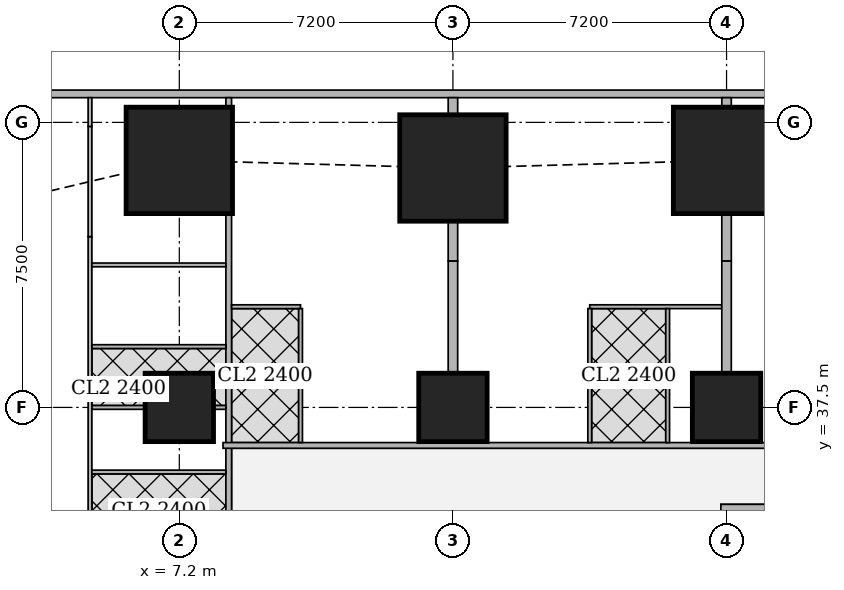
"""IFC4 building model, lengths in metres.
Left out: names, types, materials, properties, quantities, classifications, styles, units other than length and angle.
Written with IfcOpenShell. Run it as: python <this file> out.ifc"""

import sys

from ifc_helpers import new_model, si_unit, direction, frame, frame_2d, origin, origin_2d, place, context, subcontext, project, spatial, rectangle, extrude, element, fill, save


model = new_model("IFC4")
c1 = context("Model", 3, precision=1e-05, world=origin(), true_north=direction((0.0, 1.0)))
c2 = subcontext(c1, "Body", "Model", "MODEL_VIEW")
j1 = project(units=[si_unit("LENGTHUNIT", "METRE"), si_unit("PLANEANGLEUNIT", "RADIAN")], contexts=[c1])
p1 = place(None, origin())
s1 = spatial("IfcSite", under=j1, at=p1, CompositionType="ELEMENT")
p2 = place(p1, origin())
s2 = spatial("IfcBuilding", under=s1, at=p2, CompositionType="ELEMENT")
p3 = place(p2, frame((0.0, 0.0, 42.5)))
s3 = spatial("IfcBuildingStorey", under=s2, at=p3, CompositionType="ELEMENT", Elevation=42.5)
for number, where, z_axis, x_axis in (
    (1, (7.2, 37.5, 0.0), (0.0, 0.0, 1.0), (1.0, 0.0, 0.0)),
    (2, (14.4, 37.5, 0.0), (0.0, 0.0, 1.0), (1.0, 0.0, 0.0)),
    (3, (21.6, 37.5, 0.0), (0.0, 0.0, 1.0), (1.0, 0.0, 0.0)),
):
    element("IfcColumn", number, at=place(p3, frame(where, z_axis=z_axis, x_axis=x_axis)), inside=s3, PredefinedType="COLUMN", context=c2, shape_type="SweptSolid", body=[
        extrude(rectangle(XDim=1.8, YDim=1.8, at=origin_2d()), origin(), (0.0, 0.0, 1.0), 3.75),
    ])
for number, where, z_axis, x_axis in (
    (4, (7.2, 44.0, 0.0), (0.0, 0.0, 1.0), (1.0, 0.0, 0.0)),
    (5, (14.4, 43.8, 0.0), (0.0, 0.0, 1.0), (1.0, 0.0, 0.0)),
    (6, (21.6, 44.0, 0.0), (0.0, 0.0, 1.0), (1.0, 0.0, 0.0)),
):
    element("IfcColumn", number, at=place(p3, frame(where, z_axis=z_axis, x_axis=x_axis)), inside=s3, PredefinedType="COLUMN", context=c2, shape_type="SweptSolid", body=[
        extrude(rectangle(XDim=2.8, YDim=2.8, at=origin_2d()), origin(), (0.0, 0.0, 1.0), 3.75),
    ])
p4 = place(p3, frame((21.45, 34.8, 0.0), z_axis=(0.0, 0.0, 1.0), x_axis=(1.0, 0.0, 0.0)))
e7 = element("IfcWall", 7, at=p4, inside=s3, PredefinedType="SHEAR", context=c2, shape_type="SweptSolid", body=[
    extrude(rectangle(XDim=7.5, YDim=0.3, at=frame_2d((3.75, 0.0))), origin(), (0.0, 0.0, 1.0), 3.75),
])
p5 = place(p4, frame((0.5, 0.0, 0.0)))
e8 = element("IfcOpeningElement", 8, at=p5, cuts=e7, PredefinedType="OPENING", context=c2, shape_type="SweptSolid", body=[
    extrude(rectangle(XDim=1.1, YDim=2.1, at=frame_2d((0.55, 1.05))), frame((0.0, 0.16, 0.0), z_axis=(0.0, -1.0, 0.0), x_axis=(1.0, 0.0, 0.0)), (0.0, 0.0, 1.0), 0.32),
])
p6 = place(p3, frame((40.106, 45.75, 0.0), z_axis=(0.0, 0.0, 1.0), x_axis=(-1.0, 0.0, 0.0)))
e9 = element("IfcWall", 9, at=p6, inside=s3, PredefinedType="SOLIDWALL", context=c2, shape_type="SweptSolid", body=[
    extrude(rectangle(XDim=37.943, YDim=0.2, at=frame_2d((18.971, 0.0))), origin(), (0.0, 0.0, 1.0), 3.5),
])
p7 = place(p6, frame((8.606, 0.0, 0.9)))
e10 = element("IfcOpeningElement", 10, at=p7, cuts=e9, PredefinedType="OPENING", context=c2, shape_type="SweptSolid", body=[
    extrude(rectangle(XDim=1.8, YDim=1.5, at=frame_2d((0.9, 0.75))), frame((0.0, 0.11, 0.0), z_axis=(0.0, -1.0, 0.0), x_axis=(1.0, 0.0, 0.0)), (0.0, 0.0, 1.0), 0.22),
])
p8 = place(p6, frame((12.206, 0.0, 0.9)))
e11 = element("IfcOpeningElement", 11, at=p8, cuts=e9, PredefinedType="OPENING", context=c2, shape_type="SweptSolid", body=[
    extrude(rectangle(XDim=1.8, YDim=1.5, at=frame_2d((0.9, 0.75))), frame((0.0, 0.11, 0.0), z_axis=(0.0, -1.0, 0.0), x_axis=(1.0, 0.0, 0.0)), (0.0, 0.0, 1.0), 0.22),
])
p9 = place(p6, frame((15.806, 0.0, 0.9)))
e12 = element("IfcOpeningElement", 12, at=p9, cuts=e9, PredefinedType="OPENING", context=c2, shape_type="SweptSolid", body=[
    extrude(rectangle(XDim=1.8, YDim=1.5, at=frame_2d((0.9, 0.75))), frame((0.0, 0.11, 0.0), z_axis=(0.0, -1.0, 0.0), x_axis=(1.0, 0.0, 0.0)), (0.0, 0.0, 1.0), 0.22),
])
p10 = place(p6, frame((19.406, 0.0, 0.9)))
e13 = element("IfcOpeningElement", 13, at=p10, cuts=e9, PredefinedType="OPENING", context=c2, shape_type="SweptSolid", body=[
    extrude(rectangle(XDim=1.8, YDim=1.5, at=frame_2d((0.9, 0.75))), frame((0.0, 0.11, 0.0), z_axis=(0.0, -1.0, 0.0), x_axis=(1.0, 0.0, 0.0)), (0.0, 0.0, 1.0), 0.22),
])
p11 = place(p6, frame((23.006, 0.0, 0.9)))
e14 = element("IfcOpeningElement", 14, at=p11, cuts=e9, PredefinedType="OPENING", context=c2, shape_type="SweptSolid", body=[
    extrude(rectangle(XDim=1.8, YDim=1.5, at=frame_2d((0.9, 0.75))), frame((0.0, 0.11, 0.0), z_axis=(0.0, -1.0, 0.0), x_axis=(1.0, 0.0, 0.0)), (0.0, 0.0, 1.0), 0.22),
])
p12 = place(p6, frame((26.606, 0.0, 0.9)))
e15 = element("IfcOpeningElement", 15, at=p12, cuts=e9, PredefinedType="OPENING", context=c2, shape_type="SweptSolid", body=[
    extrude(rectangle(XDim=1.8, YDim=1.5, at=frame_2d((0.9, 0.75))), frame((0.0, 0.11, 0.0), z_axis=(0.0, -1.0, 0.0), x_axis=(1.0, 0.0, 0.0)), (0.0, 0.0, 1.0), 0.22),
])
p13 = place(p3, frame((8.5, 2.426, 0.0), z_axis=(0.0, 0.0, 1.0), x_axis=(0.0, 1.0, 0.0)))
e16 = element("IfcWall", 16, at=p13, inside=s3, PredefinedType="SOLIDWALL", context=c2, shape_type="SweptSolid", body=[
    extrude(rectangle(XDim=40.173, YDim=0.15, at=frame_2d((20.086, 0.0))), origin(), (0.0, 0.0, 1.0), 3.5),
])
p14 = place(p13, frame((9.986, 0.0, 0.0)))
e17 = element("IfcOpeningElement", 17, at=p14, cuts=e16, PredefinedType="OPENING", context=c2, shape_type="SweptSolid", body=[
    extrude(rectangle(XDim=1.0, YDim=2.1, at=frame_2d((0.5, 1.05))), frame((0.0, 0.085, 0.0), z_axis=(0.0, -1.0, 0.0), x_axis=(1.0, 0.0, 0.0)), (0.0, 0.0, 1.0), 0.17),
])
p15 = place(p13, frame((14.161, 0.0, 0.0)))
e18 = element("IfcOpeningElement", 18, at=p15, cuts=e16, PredefinedType="OPENING", context=c2, shape_type="SweptSolid", body=[
    extrude(rectangle(XDim=1.0, YDim=2.1, at=frame_2d((0.5, 1.05))), frame((0.0, 0.085, 0.0), z_axis=(0.0, -1.0, 0.0), x_axis=(1.0, 0.0, 0.0)), (0.0, 0.0, 1.0), 0.17),
])
p16 = place(p13, frame((21.662, 0.0, 0.0)))
e19 = element("IfcOpeningElement", 19, at=p16, cuts=e16, PredefinedType="OPENING", context=c2, shape_type="SweptSolid", body=[
    extrude(rectangle(XDim=1.0, YDim=2.1, at=frame_2d((0.5, 1.05))), frame((0.0, 0.085, 0.0), z_axis=(0.0, -1.0, 0.0), x_axis=(1.0, 0.0, 0.0)), (0.0, 0.0, 1.0), 0.17),
])
p17 = place(p13, frame((29.161, 0.0, 0.0)))
e20 = element("IfcOpeningElement", 20, at=p17, cuts=e16, PredefinedType="OPENING", context=c2, shape_type="SweptSolid", body=[
    extrude(rectangle(XDim=1.0, YDim=2.1, at=frame_2d((0.5, 1.05))), frame((0.0, 0.085, 0.0), z_axis=(0.0, -1.0, 0.0), x_axis=(1.0, 0.0, 0.0)), (0.0, 0.0, 1.0), 0.17),
])
p18 = place(p3, frame((8.5, 45.401, 0.0), z_axis=(0.0, 0.0, 1.0), x_axis=(0.0, 1.0, 0.0)))
e21 = element("IfcWall", 21, at=p18, inside=s3, PredefinedType="SOLIDWALL", context=c2, shape_type="SweptSolid", body=[
    extrude(rectangle(XDim=0.249, YDim=0.15, at=frame_2d((0.125, 0.0))), origin(), (0.0, 0.0, 1.0), 3.5),
])
p19 = place(p3, frame((8.35, 36.5, 0.0), z_axis=(0.0, 0.0, 1.0), x_axis=(1.0, 0.0, 0.0)))
e22 = element("IfcWall", 22, at=p19, inside=s3, PredefinedType="SOLIDWALL", context=c2, shape_type="SweptSolid", body=[
    extrude(rectangle(XDim=26.415, YDim=0.15, at=frame_2d((13.208, 0.0))), origin(), (0.0, 0.0, 1.0), 3.5),
])
p20 = place(p19, frame((3.383, 0.0, 0.0)))
e23 = element("IfcOpeningElement", 23, at=p20, cuts=e22, PredefinedType="OPENING", context=c2, shape_type="SweptSolid", body=[
    extrude(rectangle(XDim=1.0, YDim=2.1, at=frame_2d((0.5, 1.05))), frame((0.0, 0.085, 0.0), z_axis=(0.0, -1.0, 0.0), x_axis=(1.0, 0.0, 0.0)), (0.0, 0.0, 1.0), 0.17),
])
p21 = place(p19, frame((7.65, 0.0, 0.0)))
e24 = element("IfcOpeningElement", 24, at=p21, cuts=e22, PredefinedType="OPENING", context=c2, shape_type="SweptSolid", body=[
    extrude(rectangle(XDim=1.0, YDim=2.1, at=frame_2d((0.5, 1.05))), frame((0.0, 0.085, 0.0), z_axis=(0.0, -1.0, 0.0), x_axis=(1.0, 0.0, 0.0)), (0.0, 0.0, 1.0), 0.17),
])
p22 = place(p19, frame((14.85, 0.0, 0.0)))
e25 = element("IfcOpeningElement", 25, at=p22, cuts=e22, PredefinedType="OPENING", context=c2, shape_type="SweptSolid", body=[
    extrude(rectangle(XDim=1.0, YDim=2.1, at=frame_2d((0.5, 1.05))), frame((0.0, 0.085, 0.0), z_axis=(0.0, -1.0, 0.0), x_axis=(1.0, 0.0, 0.0)), (0.0, 0.0, 1.0), 0.17),
])
p23 = place(p19, frame((23.923, 0.0, 0.0)))
e26 = element("IfcOpeningElement", 26, at=p23, cuts=e22, PredefinedType="OPENING", context=c2, shape_type="SweptSolid", body=[
    extrude(rectangle(XDim=1.0, YDim=2.1, at=frame_2d((0.5, 1.05))), frame((0.0, 0.085, 0.0), z_axis=(0.0, -1.0, 0.0), x_axis=(1.0, 0.0, 0.0)), (0.0, 0.0, 1.0), 0.17),
])
p24 = place(p3, frame((4.85, 33.75, 0.0), z_axis=(0.0, 0.0, 1.0), x_axis=(0.0, 1.0, 0.0)))
e27 = element("IfcWall", 27, at=p24, inside=s3, PredefinedType="PARTITIONING", context=c2, shape_type="SweptSolid", body=[
    extrude(rectangle(XDim=8.244, YDim=0.1, at=frame_2d((4.122, 0.0))), origin(), (0.0, 0.0, 1.0), 3.5),
])
p25 = place(p24, frame((0.575, 0.0, 0.0)))
e28 = element("IfcOpeningElement", 28, at=p25, cuts=e27, PredefinedType="OPENING", context=c2, shape_type="SweptSolid", body=[
    extrude(rectangle(XDim=0.9, YDim=2.1, at=frame_2d((0.45, 1.05))), frame((0.0, 0.06, 0.0), z_axis=(0.0, -1.0, 0.0), x_axis=(1.0, 0.0, 0.0)), (0.0, 0.0, 1.0), 0.12),
])
p26 = place(p24, frame((4.1, 0.0, 0.0)))
e29 = element("IfcOpeningElement", 29, at=p26, cuts=e27, PredefinedType="OPENING", context=c2, shape_type="SweptSolid", body=[
    extrude(rectangle(XDim=0.9, YDim=2.1, at=frame_2d((0.45, 1.05))), frame((0.0, 0.06, 0.0), z_axis=(0.0, -1.0, 0.0), x_axis=(1.0, 0.0, 0.0)), (0.0, 0.0, 1.0), 0.12),
])
p27 = place(p24, frame((2.45, 0.0, 0.0)))
e30 = element("IfcOpeningElement", 30, at=p27, cuts=e27, PredefinedType="OPENING", context=c2, shape_type="SweptSolid", body=[
    extrude(rectangle(XDim=0.9, YDim=2.1, at=frame_2d((0.45, 1.05))), frame((0.0, 0.06, 0.0), z_axis=(0.0, -1.0, 0.0), x_axis=(1.0, 0.0, 0.0)), (0.0, 0.0, 1.0), 0.12),
])
p28 = place(p24, frame((5.975, 0.0, 0.0)))
e31 = element("IfcOpeningElement", 31, at=p28, cuts=e27, PredefinedType="OPENING", context=c2, shape_type="SweptSolid", body=[
    extrude(rectangle(XDim=0.9, YDim=2.1, at=frame_2d((0.45, 1.05))), frame((0.0, 0.06, 0.0), z_axis=(0.0, -1.0, 0.0), x_axis=(1.0, 0.0, 0.0)), (0.0, 0.0, 1.0), 0.12),
])
p29 = place(p3, frame((4.85, 41.994, 0.0), z_axis=(0.0, 0.0, 1.0), x_axis=(0.0, 1.0, 0.0)))
e32 = element("IfcWall", 32, at=p29, inside=s3, PredefinedType="PARTITIONING", context=c2, shape_type="SweptSolid", body=[
    extrude(rectangle(XDim=2.901, YDim=0.1, at=frame_2d((1.451, 0.0))), origin(), (0.0, 0.0, 1.0), 2.05),
])
p30 = place(p3, frame((4.85, 44.895, 0.0), z_axis=(0.0, 0.0, 1.0), x_axis=(0.0, 1.0, 0.0)))
e33 = element("IfcWall", 33, at=p30, inside=s3, PredefinedType="PARTITIONING", context=c2, shape_type="SweptSolid", body=[
    extrude(rectangle(XDim=0.755, YDim=0.1, at=frame_2d((0.377, 0.0))), origin(), (0.0, 0.0, 1.0), 3.5),
])
p31 = place(p3, frame((4.9, 37.5, 0.0), z_axis=(0.0, 0.0, 1.0), x_axis=(1.0, 0.0, 0.0)))
e34 = element("IfcWall", 34, at=p31, inside=s3, PredefinedType="PARTITIONING", context=c2, shape_type="SweptSolid", body=[
    extrude(rectangle(XDim=1.399, YDim=0.1, at=frame_2d((0.7, 0.0))), origin(), (0.0, 0.0, 1.0), 3.5),
])
p32 = place(p3, frame((8.101, 37.5, 0.0), z_axis=(0.0, 0.0, 1.0), x_axis=(1.0, 0.0, 0.0)))
e35 = element("IfcWall", 35, at=p32, inside=s3, PredefinedType="PARTITIONING", context=c2, shape_type="SweptSolid", body=[
    extrude(rectangle(XDim=0.324, YDim=0.1, at=frame_2d((0.162, 0.0))), origin(), (0.0, 0.0, 1.0), 3.5),
])
for number, where, z_axis, x_axis in (
    (36, (4.9, 41.25, 0.0), (0.0, 0.0, 1.0), (1.0, 0.0, 0.0)),
    (37, (4.9, 35.8, 0.0), (0.0, 0.0, 1.0), (1.0, 0.0, 0.0)),
    (38, (4.9, 39.1, 0.0), (0.0, 0.0, 1.0), (1.0, 0.0, 0.0)),
):
    element("IfcWall", number, at=place(p3, frame(where, z_axis=z_axis, x_axis=x_axis)), inside=s3, PredefinedType="PARTITIONING", context=c2, shape_type="SweptSolid", body=[
        extrude(rectangle(XDim=3.525, YDim=0.1, at=frame_2d((1.763, 0.0))), origin(), (0.0, 0.0, 1.0), 3.5),
    ])
p33 = place(p3, frame((8.575, 40.15, 0.0), z_axis=(0.0, 0.0, 1.0), x_axis=(1.0, 0.0, 0.0)))
e39 = element("IfcWall", 39, at=p33, inside=s3, PredefinedType="PARTITIONING", context=c2, shape_type="SweptSolid", body=[
    extrude(rectangle(XDim=1.815, YDim=0.1, at=frame_2d((0.907, 0.0))), origin(), (0.0, 0.0, 1.0), 3.5),
])
p34 = place(p33, frame((0.425, 0.0, 0.0)))
e40 = element("IfcOpeningElement", 40, at=p34, cuts=e39, PredefinedType="OPENING", context=c2, shape_type="SweptSolid", body=[
    extrude(rectangle(XDim=0.9, YDim=2.1, at=frame_2d((0.45, 1.05))), frame((0.0, 0.06, 0.0), z_axis=(0.0, -1.0, 0.0), x_axis=(1.0, 0.0, 0.0)), (0.0, 0.0, 1.0), 0.12),
])
p35 = place(p3, frame((10.39, 36.575, 0.0), z_axis=(0.0, 0.0, 1.0), x_axis=(0.0, 1.0, 0.0)))
e41 = element("IfcWall", 41, at=p35, inside=s3, PredefinedType="PARTITIONING", context=c2, shape_type="SweptSolid", body=[
    extrude(rectangle(XDim=3.525, YDim=0.1, at=frame_2d((1.763, 0.0))), origin(), (0.0, 0.0, 1.0), 3.5),
])
p36 = place(p3, frame((18.0, 40.15, 0.0), z_axis=(0.0, 0.0, 1.0), x_axis=(1.0, 0.0, 0.0)))
e42 = element("IfcWall", 42, at=p36, inside=s3, PredefinedType="PARTITIONING", context=c2, shape_type="SweptSolid", body=[
    extrude(rectangle(XDim=3.475, YDim=0.1, at=frame_2d((1.738, 0.0))), origin(), (0.0, 0.0, 1.0), 3.5),
])
p37 = place(p36, frame((0.575, 0.0, 0.0)))
e43 = element("IfcOpeningElement", 43, at=p37, cuts=e42, PredefinedType="OPENING", context=c2, shape_type="SweptSolid", body=[
    extrude(rectangle(XDim=0.9, YDim=2.1, at=frame_2d((0.45, 1.05))), frame((0.0, 0.06, 0.0), z_axis=(0.0, -1.0, 0.0), x_axis=(1.0, 0.0, 0.0)), (0.0, 0.0, 1.0), 0.12),
])
p38 = place(p36, frame((2.375, 0.0, 0.0)))
e44 = element("IfcOpeningElement", 44, at=p38, cuts=e42, PredefinedType="OPENING", context=c2, shape_type="SweptSolid", body=[
    extrude(rectangle(XDim=0.9, YDim=2.1, at=frame_2d((0.45, 1.05))), frame((0.0, 0.06, 0.0), z_axis=(0.0, -1.0, 0.0), x_axis=(1.0, 0.0, 0.0)), (0.0, 0.0, 1.0), 0.12),
])
for number, where, z_axis, x_axis in (
    (45, (18.0, 36.575, 0.0), (0.0, 0.0, 1.0), (0.0, 1.0, 0.0)),
    (46, (20.05, 36.575, 0.0), (0.0, 0.0, 1.0), (0.0, 1.0, 0.0)),
):
    element("IfcWall", number, at=place(p3, frame(where, z_axis=z_axis, x_axis=x_axis)), inside=s3, PredefinedType="PARTITIONING", context=c2, shape_type="SweptSolid", body=[
        extrude(rectangle(XDim=3.525, YDim=0.1, at=frame_2d((1.763, 0.0))), origin(), (0.0, 0.0, 1.0), 3.5),
    ])
p39 = place(p3, frame((14.4, 41.35, 0.0), z_axis=(0.0, 0.0, 1.0), x_axis=(0.0, 1.0, 0.0)))
e47 = element("IfcWall", 47, at=p39, inside=s3, PredefinedType="SOLIDWALL", context=c2, shape_type="SweptSolid", body=[
    extrude(rectangle(XDim=1.049, YDim=0.25, at=frame_2d((0.524, 0.0))), origin(), (0.0, 0.0, 1.0), 3.5),
])
p40 = place(p3, frame((14.4, 45.201, 0.0), z_axis=(0.0, 0.0, 1.0), x_axis=(0.0, 1.0, 0.0)))
e48 = element("IfcWall", 48, at=p40, inside=s3, PredefinedType="SOLIDWALL", context=c2, shape_type="SweptSolid", body=[
    extrude(rectangle(XDim=0.449, YDim=0.25, at=frame_2d((0.225, 0.0))), origin(), (0.0, 0.0, 1.0), 3.5),
])
p41 = place(p3, frame((14.4, 38.401, 0.0), z_axis=(0.0, 0.0, 1.0), x_axis=(0.0, 1.0, 0.0)))
e49 = element("IfcWall", 49, at=p41, inside=s3, PredefinedType="SOLIDWALL", context=c2, shape_type="SweptSolid", body=[
    extrude(rectangle(XDim=2.949, YDim=0.25, at=frame_2d((1.475, 0.0))), origin(), (0.0, 0.0, 1.0), 3.5),
])
p42 = place(p3, frame((21.6, 41.35, 0.0), z_axis=(0.0, 0.0, 1.0), x_axis=(0.0, 1.0, 0.0)))
e50 = element("IfcWall", 50, at=p42, inside=s3, PredefinedType="SOLIDWALL", context=c2, shape_type="SweptSolid", body=[
    extrude(rectangle(XDim=1.249, YDim=0.25, at=frame_2d((0.625, 0.0))), origin(), (0.0, 0.0, 1.0), 3.5),
])
p43 = place(p3, frame((21.6, 45.401, 0.0), z_axis=(0.0, 0.0, 1.0), x_axis=(0.0, 1.0, 0.0)))
e51 = element("IfcWall", 51, at=p43, inside=s3, PredefinedType="SOLIDWALL", context=c2, shape_type="SweptSolid", body=[
    extrude(rectangle(XDim=0.249, YDim=0.25, at=frame_2d((0.125, 0.0))), origin(), (0.0, 0.0, 1.0), 3.5),
])
p44 = place(p3, frame((21.6, 38.401, 0.0), z_axis=(0.0, 0.0, 1.0), x_axis=(0.0, 1.0, 0.0)))
e52 = element("IfcWall", 52, at=p44, inside=s3, PredefinedType="SOLIDWALL", context=c2, shape_type="SweptSolid", body=[
    extrude(rectangle(XDim=2.949, YDim=0.25, at=frame_2d((1.475, 0.0))), origin(), (0.0, 0.0, 1.0), 3.5),
])
p45 = place(p9, origin())
e53 = element("IfcWindow", 53, at=p45, inside=s3, PartitioningType="SINGLE_PANEL", PredefinedType="WINDOW", context=c2, shape_type="SweptSolid", body=[
    extrude(rectangle(XDim=1.8, YDim=1.5, at=frame_2d((0.9, 0.75))), frame((0.0, 0.03, 0.0), z_axis=(0.0, -1.0, 0.0), x_axis=(1.0, 0.0, 0.0)), (0.0, 0.0, 1.0), 0.06),
])
fill(e12, e53)
p46 = place(p10, origin())
e54 = element("IfcWindow", 54, at=p46, inside=s3, PartitioningType="SINGLE_PANEL", PredefinedType="WINDOW", context=c2, shape_type="SweptSolid", body=[
    extrude(rectangle(XDim=1.8, YDim=1.5, at=frame_2d((0.9, 0.75))), frame((0.0, 0.03, 0.0), z_axis=(0.0, -1.0, 0.0), x_axis=(1.0, 0.0, 0.0)), (0.0, 0.0, 1.0), 0.06),
])
fill(e13, e54)
p47 = place(p11, origin())
e55 = element("IfcWindow", 55, at=p47, inside=s3, PartitioningType="SINGLE_PANEL", PredefinedType="WINDOW", context=c2, shape_type="SweptSolid", body=[
    extrude(rectangle(XDim=1.8, YDim=1.5, at=frame_2d((0.9, 0.75))), frame((0.0, 0.03, 0.0), z_axis=(0.0, -1.0, 0.0), x_axis=(1.0, 0.0, 0.0)), (0.0, 0.0, 1.0), 0.06),
])
fill(e14, e55)
p48 = place(p12, origin())
e56 = element("IfcWindow", 56, at=p48, inside=s3, PartitioningType="SINGLE_PANEL", PredefinedType="WINDOW", context=c2, shape_type="SweptSolid", body=[
    extrude(rectangle(XDim=1.8, YDim=1.5, at=frame_2d((0.9, 0.75))), frame((0.0, 0.03, 0.0), z_axis=(0.0, -1.0, 0.0), x_axis=(1.0, 0.0, 0.0)), (0.0, 0.0, 1.0), 0.06),
])
fill(e15, e56)
p49 = place(p25, origin())
e57 = element("IfcDoor", 57, at=p49, inside=s3, OperationType="SINGLE_SWING_RIGHT", PredefinedType="DOOR", context=c2, shape_type="SweptSolid", body=[
    extrude(rectangle(XDim=0.9, YDim=2.1, at=frame_2d((0.45, 1.05))), frame((0.0, 0.025, 0.0), z_axis=(0.0, -1.0, 0.0), x_axis=(1.0, 0.0, 0.0)), (0.0, 0.0, 1.0), 0.05),
])
fill(e28, e57)
p50 = place(p26, origin())
e58 = element("IfcDoor", 58, at=p50, inside=s3, OperationType="SINGLE_SWING_LEFT", PredefinedType="DOOR", context=c2, shape_type="SweptSolid", body=[
    extrude(rectangle(XDim=0.9, YDim=2.1, at=frame_2d((0.45, 1.05))), frame((0.0, 0.025, 0.0), z_axis=(0.0, -1.0, 0.0), x_axis=(1.0, 0.0, 0.0)), (0.0, 0.0, 1.0), 0.05),
])
fill(e29, e58)
p51 = place(p27, origin())
e59 = element("IfcDoor", 59, at=p51, inside=s3, OperationType="SINGLE_SWING_LEFT", PredefinedType="DOOR", context=c2, shape_type="SweptSolid", body=[
    extrude(rectangle(XDim=0.9, YDim=2.1, at=frame_2d((0.45, 1.05))), frame((0.0, 0.025, 0.0), z_axis=(0.0, -1.0, 0.0), x_axis=(1.0, 0.0, 0.0)), (0.0, 0.0, 1.0), 0.05),
])
fill(e30, e59)
p52 = place(p28, origin())
e60 = element("IfcDoor", 60, at=p52, inside=s3, OperationType="SINGLE_SWING_RIGHT", PredefinedType="DOOR", context=c2, shape_type="SweptSolid", body=[
    extrude(rectangle(XDim=0.9, YDim=2.1, at=frame_2d((0.45, 1.05))), frame((0.0, 0.025, 0.0), z_axis=(0.0, -1.0, 0.0), x_axis=(1.0, 0.0, 0.0)), (0.0, 0.0, 1.0), 0.05),
])
fill(e31, e60)
p53 = place(p34, origin())
e61 = element("IfcDoor", 61, at=p53, inside=s3, OperationType="SINGLE_SWING_RIGHT", PredefinedType="DOOR", context=c2, shape_type="SweptSolid", body=[
    extrude(rectangle(XDim=0.9, YDim=2.1, at=frame_2d((0.45, 1.05))), frame((0.0, 0.025, 0.0), z_axis=(0.0, -1.0, 0.0), x_axis=(1.0, 0.0, 0.0)), (0.0, 0.0, 1.0), 0.05),
])
fill(e40, e61)
p54 = place(p20, origin())
e62 = element("IfcDoor", 62, at=p54, inside=s3, OperationType="SINGLE_SWING_RIGHT", PredefinedType="DOOR", context=c2, shape_type="SweptSolid", body=[
    extrude(rectangle(XDim=1.0, YDim=2.1, at=frame_2d((0.5, 1.05))), frame((0.0, 0.025, 0.0), z_axis=(0.0, -1.0, 0.0), x_axis=(1.0, 0.0, 0.0)), (0.0, 0.0, 1.0), 0.05),
])
fill(e23, e62)
p55 = place(p37, origin())
e63 = element("IfcDoor", 63, at=p55, inside=s3, OperationType="SINGLE_SWING_RIGHT", PredefinedType="DOOR", context=c2, shape_type="SweptSolid", body=[
    extrude(rectangle(XDim=0.9, YDim=2.1, at=frame_2d((0.45, 1.05))), frame((0.0, 0.025, 0.0), z_axis=(0.0, -1.0, 0.0), x_axis=(1.0, 0.0, 0.0)), (0.0, 0.0, 1.0), 0.05),
])
fill(e43, e63)
p56 = place(p38, origin())
e64 = element("IfcDoor", 64, at=p56, inside=s3, OperationType="SINGLE_SWING_LEFT", PredefinedType="DOOR", context=c2, shape_type="SweptSolid", body=[
    extrude(rectangle(XDim=0.9, YDim=2.1, at=frame_2d((0.45, 1.05))), frame((0.0, 0.025, 0.0), z_axis=(0.0, -1.0, 0.0), x_axis=(1.0, 0.0, 0.0)), (0.0, 0.0, 1.0), 0.05),
])
fill(e44, e64)
p57 = place(p21, origin())
e65 = element("IfcDoor", 65, at=p57, inside=s3, OperationType="SINGLE_SWING_RIGHT", PredefinedType="DOOR", context=c2, shape_type="SweptSolid", body=[
    extrude(rectangle(XDim=1.0, YDim=2.1, at=frame_2d((0.5, 1.05))), frame((0.0, 0.025, 0.0), z_axis=(0.0, -1.0, 0.0), x_axis=(1.0, 0.0, 0.0)), (0.0, 0.0, 1.0), 0.05),
])
fill(e24, e65)
p58 = place(p5, origin())
e66 = element("IfcDoor", 66, at=p58, inside=s3, OperationType="SINGLE_SWING_RIGHT", PredefinedType="DOOR", context=c2, shape_type="SweptSolid", body=[
    extrude(rectangle(XDim=1.1, YDim=2.1, at=frame_2d((0.55, 1.05))), frame((0.0, 0.025, 0.0), z_axis=(0.0, -1.0, 0.0), x_axis=(1.0, 0.0, 0.0)), (0.0, 0.0, 1.0), 0.05),
])
fill(e8, e66)
save(model, sys.argv[1])
